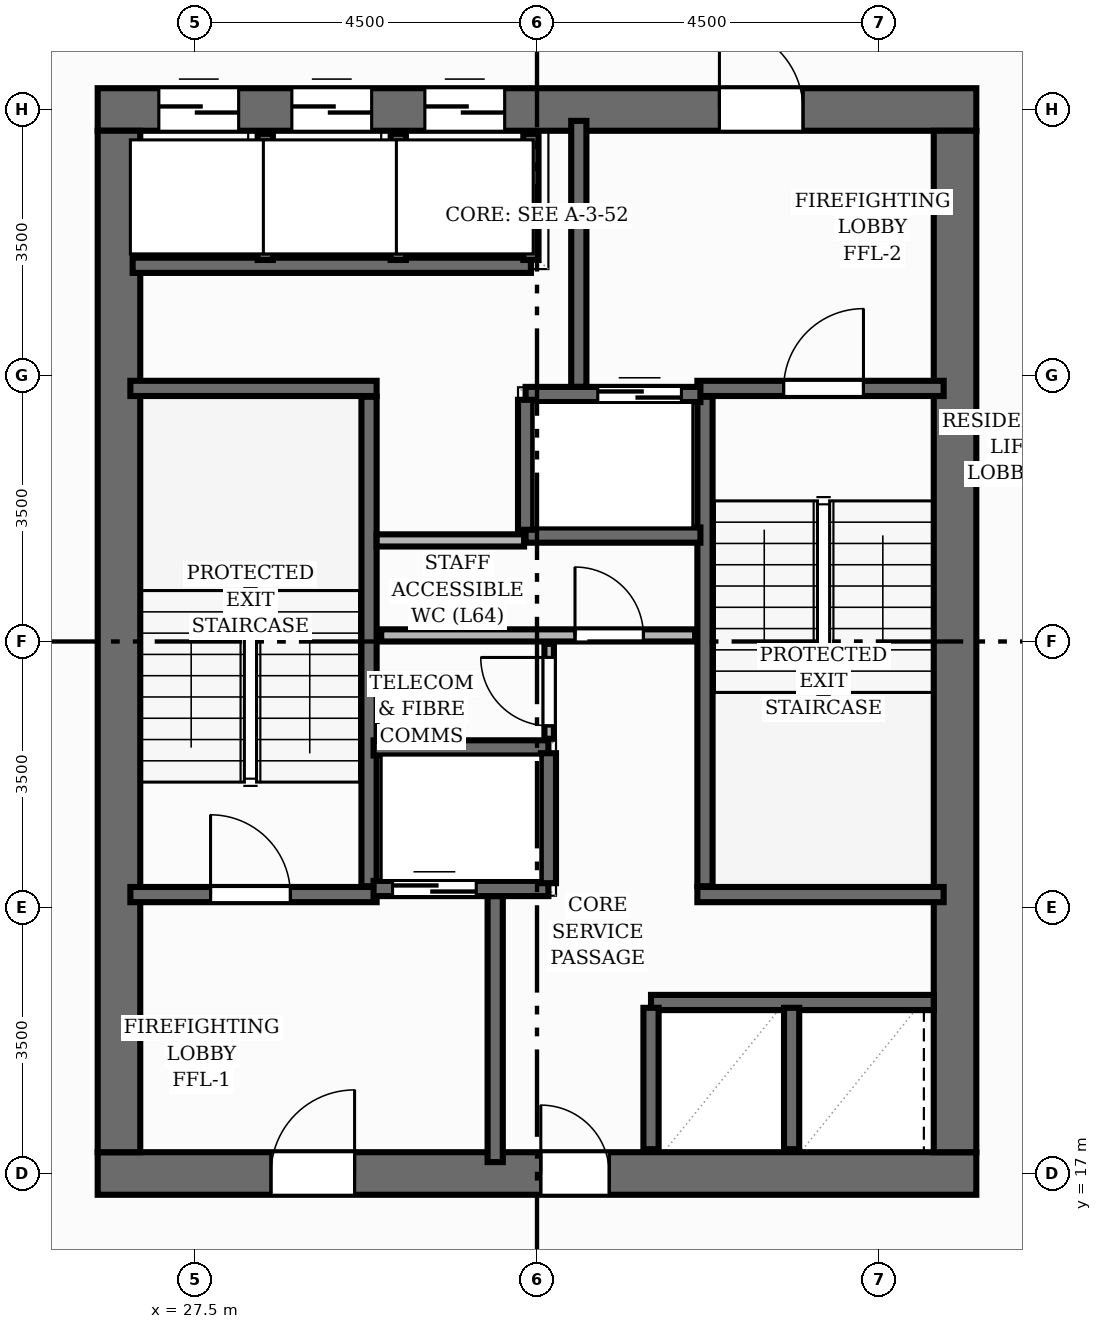
"""IFC4 building model, lengths in metres.
Left out: names, types, materials, properties, quantities, classifications, styles, units other than length and angle.
Written with IfcOpenShell. Run it as: python <this file> out.ifc"""

import sys

from ifc_helpers import new_model, si_unit, direction, frame, frame_2d, origin, place, context, subcontext, project, spatial, rectangle, extrude, element, fill, save


model = new_model("IFC4")
c1 = context("Model", 3, precision=1e-05, world=origin(), true_north=direction((0.0, 1.0)))
c2 = subcontext(c1, "Body", "Model", "MODEL_VIEW")
j1 = project(units=[si_unit("LENGTHUNIT", "METRE"), si_unit("PLANEANGLEUNIT", "RADIAN")], contexts=[c1])
p1 = place(None, origin())
s1 = spatial("IfcSite", under=j1, at=p1, CompositionType="ELEMENT")
p2 = place(p1, origin())
s2 = spatial("IfcBuilding", under=s1, at=p2, CompositionType="ELEMENT")
p3 = place(p2, frame((0.0, 0.0, 214.24)))
s3 = spatial("IfcBuildingStorey", under=s2, at=p3, CompositionType="ELEMENT", Elevation=214.24)
p4 = place(p3, frame((26.22, 17.0, 0.0), z_axis=(0.0, 0.0, 1.0), x_axis=(1.0, 0.0, 0.0)))
e1 = element("IfcWall", 1, at=p4, inside=s3, PredefinedType="SHEAR", context=c2, shape_type="SweptSolid", body=[
    extrude(rectangle(XDim=11.56, YDim=0.56, at=frame_2d((5.78, 0.0))), origin(), (0.0, 0.0, 1.0), 3.2),
])
p5 = place(p4, frame((2.28, 0.0, 0.0)))
e2 = element("IfcOpeningElement", 2, at=p5, cuts=e1, PredefinedType="OPENING", context=c2, shape_type="SweptSolid", body=[
    extrude(rectangle(XDim=1.1, YDim=2.15, at=frame_2d((0.55, 1.075))), frame((0.0, 0.29, 0.0), z_axis=(0.0, -1.0, 0.0), x_axis=(1.0, 0.0, 0.0)), (0.0, 0.0, 1.0), 0.58),
])
p6 = place(p4, frame((5.83, 0.0, 0.0)))
e3 = element("IfcOpeningElement", 3, at=p6, cuts=e1, PredefinedType="OPENING", context=c2, shape_type="SweptSolid", body=[
    extrude(rectangle(XDim=0.9, YDim=2.1, at=frame_2d((0.45, 1.05))), frame((0.0, 0.29, 0.0), z_axis=(0.0, -1.0, 0.0), x_axis=(1.0, 0.0, 0.0)), (0.0, 0.0, 1.0), 0.58),
])
p7 = place(p3, frame((26.22, 31.0, 0.0), z_axis=(0.0, 0.0, 1.0), x_axis=(1.0, 0.0, 0.0)))
e4 = element("IfcWall", 4, at=p7, inside=s3, PredefinedType="SHEAR", context=c2, shape_type="SweptSolid", body=[
    extrude(rectangle(XDim=11.56, YDim=0.56, at=frame_2d((5.78, 0.0))), origin(), (0.0, 0.0, 1.0), 3.2),
])
p8 = place(p7, frame((8.18, 0.0, 0.0)))
e5 = element("IfcOpeningElement", 5, at=p8, cuts=e4, PredefinedType="OPENING", context=c2, shape_type="SweptSolid", body=[
    extrude(rectangle(XDim=1.1, YDim=2.15, at=frame_2d((0.55, 1.075))), frame((0.0, 0.29, 0.0), z_axis=(0.0, -1.0, 0.0), x_axis=(1.0, 0.0, 0.0)), (0.0, 0.0, 1.0), 0.58),
])
p9 = place(p7, frame((0.805, 0.0, 0.0)))
e6 = element("IfcOpeningElement", 6, at=p9, cuts=e4, PredefinedType="OPENING", context=c2, shape_type="SweptSolid", body=[
    extrude(rectangle(XDim=1.05, YDim=2.15, at=frame_2d((0.525, 1.075))), frame((0.0, 0.29, 0.0), z_axis=(0.0, -1.0, 0.0), x_axis=(1.0, 0.0, 0.0)), (0.0, 0.0, 1.0), 0.58),
])
p10 = place(p7, frame((2.555, 0.0, 0.0)))
e7 = element("IfcOpeningElement", 7, at=p10, cuts=e4, PredefinedType="OPENING", context=c2, shape_type="SweptSolid", body=[
    extrude(rectangle(XDim=1.05, YDim=2.15, at=frame_2d((0.525, 1.075))), frame((0.0, 0.29, 0.0), z_axis=(0.0, -1.0, 0.0), x_axis=(1.0, 0.0, 0.0)), (0.0, 0.0, 1.0), 0.58),
])
p11 = place(p7, frame((4.305, 0.0, 0.0)))
e8 = element("IfcOpeningElement", 8, at=p11, cuts=e4, PredefinedType="OPENING", context=c2, shape_type="SweptSolid", body=[
    extrude(rectangle(XDim=1.05, YDim=2.15, at=frame_2d((0.525, 1.075))), frame((0.0, 0.29, 0.0), z_axis=(0.0, -1.0, 0.0), x_axis=(1.0, 0.0, 0.0)), (0.0, 0.0, 1.0), 0.58),
])
for number, where, z_axis, x_axis in (
    (9, (26.5, 17.28, 0.0), (0.0, 0.0, 1.0), (0.0, 1.0, 0.0)),
    (10, (37.5, 17.28, 0.0), (0.0, 0.0, 1.0), (0.0, 1.0, 0.0)),
):
    element("IfcWall", number, at=place(p3, frame(where, z_axis=z_axis, x_axis=x_axis)), inside=s3, PredefinedType="SHEAR", context=c2, shape_type="SweptSolid", body=[
        extrude(rectangle(XDim=13.44, YDim=0.56, at=frame_2d((6.72, 0.0))), origin(), (0.0, 0.0, 1.0), 3.2),
    ])
p12 = place(p3, frame((29.79, 20.78, 0.0), z_axis=(0.0, 0.0, 1.0), x_axis=(0.0, 1.0, 0.0)))
e11 = element("IfcWall", 11, at=p12, inside=s3, PredefinedType="SHEAR", context=c2, shape_type="SweptSolid", body=[
    extrude(rectangle(XDim=6.44, YDim=0.2, at=frame_2d((3.22, 0.0))), origin(), (0.0, 0.0, 1.0), 3.2),
])
p13 = place(p3, frame((26.65, 27.33, 0.0), z_axis=(0.0, 0.0, 1.0), x_axis=(1.0, 0.0, 0.0)))
e12 = element("IfcWall", 12, at=p13, inside=s3, PredefinedType="SHEAR", context=c2, shape_type="SweptSolid", body=[
    extrude(rectangle(XDim=3.24, YDim=0.2, at=frame_2d((1.62, 0.0))), origin(), (0.0, 0.0, 1.0), 3.2),
])
p14 = place(p3, frame((26.65, 20.67, 0.0), z_axis=(0.0, 0.0, 1.0), x_axis=(1.0, 0.0, 0.0)))
e13 = element("IfcWall", 13, at=p14, inside=s3, PredefinedType="SHEAR", context=c2, shape_type="SweptSolid", body=[
    extrude(rectangle(XDim=3.24, YDim=0.2, at=frame_2d((1.62, 0.0))), origin(), (0.0, 0.0, 1.0), 3.2),
])
p15 = place(p14, frame((1.055, 0.0, 0.0)))
e14 = element("IfcOpeningElement", 14, at=p15, cuts=e13, PredefinedType="OPENING", context=c2, shape_type="SweptSolid", body=[
    extrude(rectangle(XDim=1.05, YDim=2.15, at=frame_2d((0.525, 1.075))), frame((0.0, 0.11, 0.0), z_axis=(0.0, -1.0, 0.0), x_axis=(1.0, 0.0, 0.0)), (0.0, 0.0, 1.0), 0.22),
])
p16 = place(p3, frame((34.21, 20.78, 0.0), z_axis=(0.0, 0.0, 1.0), x_axis=(0.0, 1.0, 0.0)))
e15 = element("IfcWall", 15, at=p16, inside=s3, PredefinedType="SHEAR", context=c2, shape_type="SweptSolid", body=[
    extrude(rectangle(XDim=6.44, YDim=0.2, at=frame_2d((3.22, 0.0))), origin(), (0.0, 0.0, 1.0), 3.2),
])
p17 = place(p3, frame((34.11, 20.67, 0.0), z_axis=(0.0, 0.0, 1.0), x_axis=(1.0, 0.0, 0.0)))
e16 = element("IfcWall", 16, at=p17, inside=s3, PredefinedType="SHEAR", context=c2, shape_type="SweptSolid", body=[
    extrude(rectangle(XDim=3.24, YDim=0.2, at=frame_2d((1.62, 0.0))), origin(), (0.0, 0.0, 1.0), 3.2),
])
p18 = place(p3, frame((34.11, 27.33, 0.0), z_axis=(0.0, 0.0, 1.0), x_axis=(1.0, 0.0, 0.0)))
e17 = element("IfcWall", 17, at=p18, inside=s3, PredefinedType="SHEAR", context=c2, shape_type="SweptSolid", body=[
    extrude(rectangle(XDim=3.24, YDim=0.2, at=frame_2d((1.62, 0.0))), origin(), (0.0, 0.0, 1.0), 3.2),
])
p19 = place(p18, frame((1.135, 0.0, 0.0)))
e18 = element("IfcOpeningElement", 18, at=p19, cuts=e17, PredefinedType="OPENING", context=c2, shape_type="SweptSolid", body=[
    extrude(rectangle(XDim=1.05, YDim=2.15, at=frame_2d((0.525, 1.075))), frame((0.0, 0.11, 0.0), z_axis=(0.0, -1.0, 0.0), x_axis=(1.0, 0.0, 0.0)), (0.0, 0.0, 1.0), 0.22),
])
for number, where, z_axis, x_axis in (
    (19, (31.45, 17.15, 0.0), (0.0, 0.0, 1.0), (0.0, 1.0, 0.0)),
    (20, (32.55, 27.35, 0.0), (0.0, 0.0, 1.0), (0.0, 1.0, 0.0)),
):
    element("IfcWall", number, at=place(p3, frame(where, z_axis=z_axis, x_axis=x_axis)), inside=s3, PredefinedType="SHEAR", context=c2, shape_type="SweptSolid", body=[
        extrude(rectangle(XDim=3.5, YDim=0.2, at=frame_2d((1.75, 0.0))), origin(), (0.0, 0.0, 1.0), 3.2),
    ])
p20 = place(p3, frame((29.85, 20.75, 0.0), z_axis=(0.0, 0.0, 1.0), x_axis=(1.0, 0.0, 0.0)))
e21 = element("IfcWall", 21, at=p20, inside=s3, PredefinedType="SHEAR", context=c2, shape_type="SweptSolid", body=[
    extrude(rectangle(XDim=2.3, YDim=0.2, at=frame_2d((1.15, 0.0))), origin(), (0.0, 0.0, 1.0), 3.2),
])
p21 = place(p20, frame((0.25, 0.0, 0.0)))
e22 = element("IfcOpeningElement", 22, at=p21, cuts=e21, PredefinedType="OPENING", context=c2, shape_type="SweptSolid", body=[
    extrude(rectangle(XDim=1.1, YDim=2.15, at=frame_2d((0.55, 1.075))), frame((0.0, 0.11, 0.0), z_axis=(0.0, -1.0, 0.0), x_axis=(1.0, 0.0, 0.0)), (0.0, 0.0, 1.0), 0.22),
])
p22 = place(p3, frame((29.85, 22.6, 0.0), z_axis=(0.0, 0.0, 1.0), x_axis=(1.0, 0.0, 0.0)))
e23 = element("IfcWall", 23, at=p22, inside=s3, PredefinedType="SHEAR", context=c2, shape_type="SweptSolid", body=[
    extrude(rectangle(XDim=2.3, YDim=0.2, at=frame_2d((1.15, 0.0))), origin(), (0.0, 0.0, 1.0), 3.2),
])
p23 = place(p3, frame((32.15, 20.82, 0.0), z_axis=(0.0, 0.0, 1.0), x_axis=(0.0, 1.0, 0.0)))
e24 = element("IfcWall", 24, at=p23, inside=s3, PredefinedType="SHEAR", context=c2, shape_type="SweptSolid", body=[
    extrude(rectangle(XDim=1.71, YDim=0.2, at=frame_2d((0.855, 0.0))), origin(), (0.0, 0.0, 1.0), 3.2),
])
p24 = place(p3, frame((31.85, 27.25, 0.0), z_axis=(0.0, 0.0, 1.0), x_axis=(1.0, 0.0, 0.0)))
e25 = element("IfcWall", 25, at=p24, inside=s3, PredefinedType="SHEAR", context=c2, shape_type="SweptSolid", body=[
    extrude(rectangle(XDim=2.3, YDim=0.2, at=frame_2d((1.15, 0.0))), origin(), (0.0, 0.0, 1.0), 3.2),
])
p25 = place(p24, frame((0.95, 0.0, 0.0)))
e26 = element("IfcOpeningElement", 26, at=p25, cuts=e25, PredefinedType="OPENING", context=c2, shape_type="SweptSolid", body=[
    extrude(rectangle(XDim=1.1, YDim=2.15, at=frame_2d((0.55, 1.075))), frame((0.0, 0.11, 0.0), z_axis=(0.0, -1.0, 0.0), x_axis=(1.0, 0.0, 0.0)), (0.0, 0.0, 1.0), 0.22),
])
p26 = place(p3, frame((31.85, 25.4, 0.0), z_axis=(0.0, 0.0, 1.0), x_axis=(1.0, 0.0, 0.0)))
e27 = element("IfcWall", 27, at=p26, inside=s3, PredefinedType="SHEAR", context=c2, shape_type="SweptSolid", body=[
    extrude(rectangle(XDim=2.3, YDim=0.2, at=frame_2d((1.15, 0.0))), origin(), (0.0, 0.0, 1.0), 3.2),
])
p27 = place(p3, frame((31.85, 25.47, 0.0), z_axis=(0.0, 0.0, 1.0), x_axis=(0.0, 1.0, 0.0)))
e28 = element("IfcWall", 28, at=p27, inside=s3, PredefinedType="SHEAR", context=c2, shape_type="SweptSolid", body=[
    extrude(rectangle(XDim=1.71, YDim=0.2, at=frame_2d((0.855, 0.0))), origin(), (0.0, 0.0, 1.0), 3.2),
])
p28 = place(p3, frame((26.68, 28.95, 0.0), z_axis=(0.0, 0.0, 1.0), x_axis=(1.0, 0.0, 0.0)))
e29 = element("IfcWall", 29, at=p28, inside=s3, PredefinedType="SHEAR", context=c2, shape_type="SweptSolid", body=[
    extrude(rectangle(XDim=5.24, YDim=0.2, at=frame_2d((2.62, 0.0))), origin(), (0.0, 0.0, 1.0), 3.2),
])
for number, where, z_axis, x_axis in (
    (30, (31.92, 29.02, 0.0), (0.0, 0.0, 1.0), (0.0, 1.0, 0.0)),
    (31, (28.425, 29.02, 0.0), (0.0, 0.0, 1.0), (0.0, 1.0, 0.0)),
    (32, (30.175, 29.02, 0.0), (0.0, 0.0, 1.0), (0.0, 1.0, 0.0)),
):
    element("IfcWall", number, at=place(p3, frame(where, z_axis=z_axis, x_axis=x_axis)), inside=s3, PredefinedType="SHEAR", context=c2, shape_type="SweptSolid", body=[
        extrude(rectangle(XDim=1.66, YDim=0.2, at=frame_2d((0.83, 0.0))), origin(), (0.0, 0.0, 1.0), 3.2),
    ])
p29 = place(p3, frame((33.5, 19.25, 0.0), z_axis=(0.0, 0.0, 1.0), x_axis=(1.0, 0.0, 0.0)))
e33 = element("IfcWall", 33, at=p29, inside=s3, PredefinedType="SHEAR", context=c2, shape_type="SweptSolid", body=[
    extrude(rectangle(XDim=3.72, YDim=0.2, at=frame_2d((1.86, 0.0))), origin(), (0.0, 0.0, 1.0), 3.2),
])
for number, where, z_axis, x_axis in (
    (34, (33.5, 17.32, 0.0), (0.0, 0.0, 1.0), (0.0, 1.0, 0.0)),
    (35, (35.35, 17.32, 0.0), (0.0, 0.0, 1.0), (0.0, 1.0, 0.0)),
):
    element("IfcWall", number, at=place(p3, frame(where, z_axis=z_axis, x_axis=x_axis)), inside=s3, PredefinedType="SHEAR", context=c2, shape_type="SweptSolid", body=[
        extrude(rectangle(XDim=1.86, YDim=0.2, at=frame_2d((0.93, 0.0))), origin(), (0.0, 0.0, 1.0), 3.2),
    ])
p30 = place(p3, frame((29.95, 24.08, 0.0), z_axis=(0.0, 0.0, 1.0), x_axis=(1.0, 0.0, 0.0)))
e36 = element("IfcWall", 36, at=p30, inside=s3, PredefinedType="PLUMBINGWALL", context=c2, shape_type="SweptSolid", body=[
    extrude(rectangle(XDim=4.13, YDim=0.16, at=frame_2d((2.065, 0.0))), origin(), (0.0, 0.0, 1.0), 2.955),
])
p31 = place(p30, frame((2.55, 0.0, 0.0)))
e37 = element("IfcOpeningElement", 37, at=p31, cuts=e36, PredefinedType="OPENING", context=c2, shape_type="SweptSolid", body=[
    extrude(rectangle(XDim=0.9, YDim=2.1, at=frame_2d((0.45, 1.05))), frame((0.0, 0.09, 0.0), z_axis=(0.0, -1.0, 0.0), x_axis=(1.0, 0.0, 0.0)), (0.0, 0.0, 1.0), 0.18),
])
p32 = place(p3, frame((32.16, 22.72, 0.0), z_axis=(0.0, 0.0, 1.0), x_axis=(0.0, 1.0, 0.0)))
e38 = element("IfcWall", 38, at=p32, inside=s3, PredefinedType="PARTITIONING", context=c2, shape_type="SweptSolid", body=[
    extrude(rectangle(XDim=1.25, YDim=0.125, at=frame_2d((0.625, 0.0))), origin(), (0.0, 0.0, 1.0), 2.955),
])
p33 = place(p32, frame((0.17, 0.0, 0.0)))
e39 = element("IfcOpeningElement", 39, at=p33, cuts=e38, PredefinedType="OPENING", context=c2, shape_type="SweptSolid", body=[
    extrude(rectangle(XDim=0.9, YDim=2.1, at=frame_2d((0.45, 1.05))), frame((0.0, 0.073, 0.0), z_axis=(0.0, -1.0, 0.0), x_axis=(1.0, 0.0, 0.0)), (0.0, 0.0, 1.0), 0.145),
])
p34 = place(p3, frame((29.89, 25.33, 0.0), z_axis=(0.0, 0.0, 1.0), x_axis=(1.0, 0.0, 0.0)))
e40 = element("IfcWall", 40, at=p34, inside=s3, PredefinedType="PLUMBINGWALL", context=c2, shape_type="SweptSolid", body=[
    extrude(rectangle(XDim=1.94, YDim=0.16, at=frame_2d((0.97, 0.0))), origin(), (0.0, 0.0, 1.0), 2.955),
])
p35 = place(p15, origin())
e41 = element("IfcDoor", 41, at=p35, inside=s3, OperationType="SINGLE_SWING_LEFT", PredefinedType="DOOR", context=c2, shape_type="SweptSolid", body=[
    extrude(rectangle(XDim=1.05, YDim=2.15, at=frame_2d((0.525, 1.075))), frame((0.0, 0.025, 0.0), z_axis=(0.0, -1.0, 0.0), x_axis=(1.0, 0.0, 0.0)), (0.0, 0.0, 1.0), 0.05),
])
fill(e14, e41)
p36 = place(p19, origin())
e42 = element("IfcDoor", 42, at=p36, inside=s3, OperationType="SINGLE_SWING_RIGHT", PredefinedType="DOOR", context=c2, shape_type="SweptSolid", body=[
    extrude(rectangle(XDim=1.05, YDim=2.15, at=frame_2d((0.525, 1.075))), frame((0.0, 0.025, 0.0), z_axis=(0.0, -1.0, 0.0), x_axis=(1.0, 0.0, 0.0)), (0.0, 0.0, 1.0), 0.05),
])
fill(e18, e42)
p37 = place(p5, origin())
e43 = element("IfcDoor", 43, at=p37, inside=s3, OperationType="SINGLE_SWING_RIGHT", PredefinedType="DOOR", context=c2, shape_type="SweptSolid", body=[
    extrude(rectangle(XDim=1.1, YDim=2.15, at=frame_2d((0.55, 1.075))), frame((0.0, 0.025, 0.0), z_axis=(0.0, -1.0, 0.0), x_axis=(1.0, 0.0, 0.0)), (0.0, 0.0, 1.0), 0.05),
])
fill(e2, e43)
p38 = place(p8, origin())
e44 = element("IfcDoor", 44, at=p38, inside=s3, OperationType="SINGLE_SWING_LEFT", PredefinedType="DOOR", context=c2, shape_type="SweptSolid", body=[
    extrude(rectangle(XDim=1.1, YDim=2.15, at=frame_2d((0.55, 1.075))), frame((0.0, 0.025, 0.0), z_axis=(0.0, -1.0, 0.0), x_axis=(1.0, 0.0, 0.0)), (0.0, 0.0, 1.0), 0.05),
])
fill(e5, e44)
p39 = place(p21, origin())
e45 = element("IfcDoor", 45, at=p39, inside=s3, OperationType="DOUBLE_DOOR_SLIDING", PredefinedType="DOOR", context=c2, shape_type="SweptSolid", body=[
    extrude(rectangle(XDim=1.1, YDim=2.15, at=frame_2d((0.55, 1.075))), frame((0.0, 0.025, 0.0), z_axis=(0.0, -1.0, 0.0), x_axis=(1.0, 0.0, 0.0)), (0.0, 0.0, 1.0), 0.05),
])
fill(e22, e45)
p40 = place(p25, origin())
e46 = element("IfcDoor", 46, at=p40, inside=s3, OperationType="DOUBLE_DOOR_SLIDING", PredefinedType="DOOR", context=c2, shape_type="SweptSolid", body=[
    extrude(rectangle(XDim=1.1, YDim=2.15, at=frame_2d((0.55, 1.075))), frame((0.0, 0.025, 0.0), z_axis=(0.0, -1.0, 0.0), x_axis=(1.0, 0.0, 0.0)), (0.0, 0.0, 1.0), 0.05),
])
fill(e26, e46)
p41 = place(p9, origin())
e47 = element("IfcDoor", 47, at=p41, inside=s3, OperationType="DOUBLE_DOOR_SLIDING", PredefinedType="DOOR", context=c2, shape_type="SweptSolid", body=[
    extrude(rectangle(XDim=1.05, YDim=2.15, at=frame_2d((0.525, 1.075))), frame((0.0, 0.025, 0.0), z_axis=(0.0, -1.0, 0.0), x_axis=(1.0, 0.0, 0.0)), (0.0, 0.0, 1.0), 0.05),
])
fill(e6, e47)
p42 = place(p10, origin())
e48 = element("IfcDoor", 48, at=p42, inside=s3, OperationType="DOUBLE_DOOR_SLIDING", PredefinedType="DOOR", context=c2, shape_type="SweptSolid", body=[
    extrude(rectangle(XDim=1.05, YDim=2.15, at=frame_2d((0.525, 1.075))), frame((0.0, 0.025, 0.0), z_axis=(0.0, -1.0, 0.0), x_axis=(1.0, 0.0, 0.0)), (0.0, 0.0, 1.0), 0.05),
])
fill(e7, e48)
p43 = place(p11, origin())
e49 = element("IfcDoor", 49, at=p43, inside=s3, OperationType="DOUBLE_DOOR_SLIDING", PredefinedType="DOOR", context=c2, shape_type="SweptSolid", body=[
    extrude(rectangle(XDim=1.05, YDim=2.15, at=frame_2d((0.525, 1.075))), frame((0.0, 0.025, 0.0), z_axis=(0.0, -1.0, 0.0), x_axis=(1.0, 0.0, 0.0)), (0.0, 0.0, 1.0), 0.05),
])
fill(e8, e49)
p44 = place(p6, origin())
e50 = element("IfcDoor", 50, at=p44, inside=s3, OperationType="SINGLE_SWING_LEFT", PredefinedType="DOOR", context=c2, shape_type="SweptSolid", body=[
    extrude(rectangle(XDim=0.9, YDim=2.1, at=frame_2d((0.45, 1.05))), frame((0.0, 0.025, 0.0), z_axis=(0.0, -1.0, 0.0), x_axis=(1.0, 0.0, 0.0)), (0.0, 0.0, 1.0), 0.05),
])
fill(e3, e50)
p45 = place(p31, origin())
e51 = element("IfcDoor", 51, at=p45, inside=s3, OperationType="SINGLE_SWING_LEFT", PredefinedType="DOOR", context=c2, shape_type="SweptSolid", body=[
    extrude(rectangle(XDim=0.9, YDim=2.1, at=frame_2d((0.45, 1.05))), frame((0.0, 0.025, 0.0), z_axis=(0.0, -1.0, 0.0), x_axis=(1.0, 0.0, 0.0)), (0.0, 0.0, 1.0), 0.05),
])
fill(e37, e51)
p46 = place(p33, origin())
e52 = element("IfcDoor", 52, at=p46, inside=s3, OperationType="SINGLE_SWING_RIGHT", PredefinedType="DOOR", context=c2, shape_type="SweptSolid", body=[
    extrude(rectangle(XDim=0.9, YDim=2.1, at=frame_2d((0.45, 1.05))), frame((0.0, 0.025, 0.0), z_axis=(0.0, -1.0, 0.0), x_axis=(1.0, 0.0, 0.0)), (0.0, 0.0, 1.0), 0.05),
])
fill(e39, e52)
save(model, sys.argv[1])
